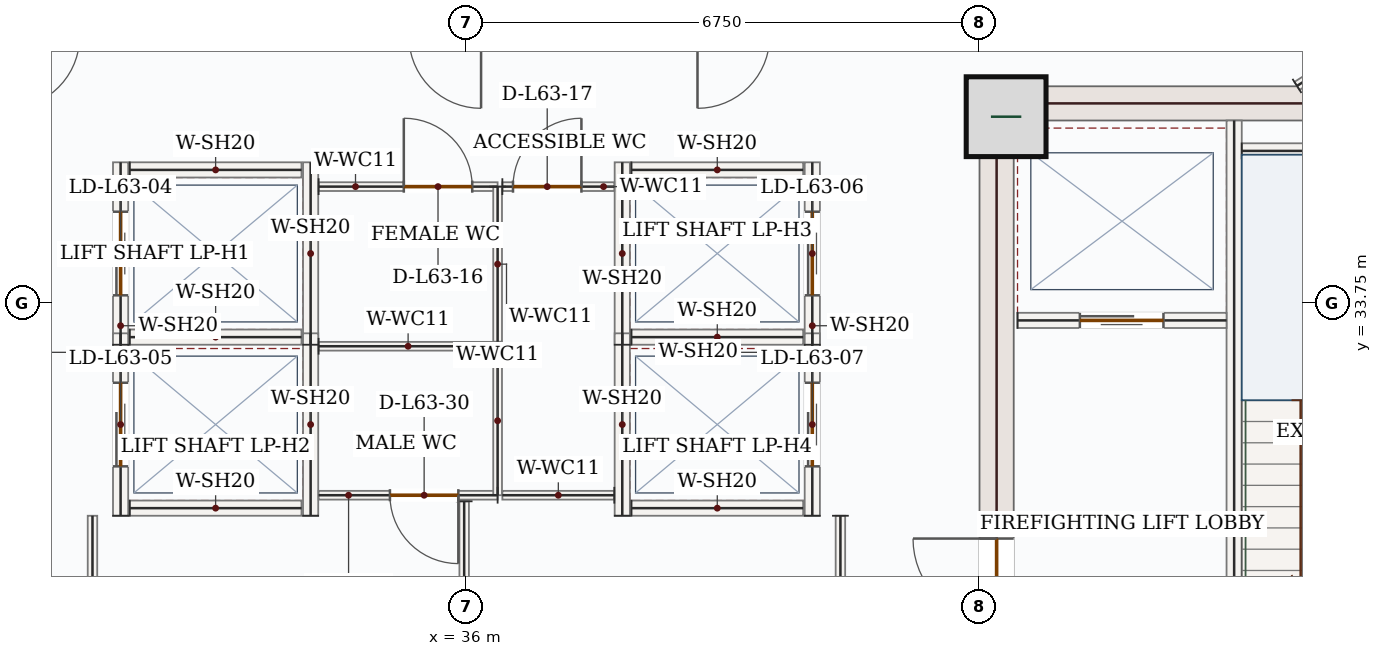
"""IFC4 building model, lengths in metres.
Left out: names, types, materials, properties, quantities, classifications, styles, units other than length and angle.
Written with IfcOpenShell. Run it as: python <this file> out.ifc"""

import sys

from ifc_helpers import new_model, si_unit, direction, frame, frame_2d, origin, origin_2d, place, context, subcontext, project, spatial, rectangle, extrude, source, transform, mapped, element, fill, save


model = new_model("IFC4")
c1 = context("Model", 3, precision=1e-05, world=origin(), true_north=direction((0.0, 1.0)))
c2 = subcontext(c1, "Body", "Model", "MODEL_VIEW")
j1 = project(units=[si_unit("LENGTHUNIT", "METRE"), si_unit("PLANEANGLEUNIT", "RADIAN")], contexts=[c1])
p1 = place(None, origin())
s1 = spatial("IfcSite", under=j1, at=p1, CompositionType="ELEMENT")
p2 = place(p1, origin())
s2 = spatial("IfcBuilding", under=s1, at=p2, CompositionType="ELEMENT")
p3 = place(p2, frame((0.0, 0.0, 265.35)))
s3 = spatial("IfcBuildingStorey", under=s2, at=p3, CompositionType="ELEMENT", Elevation=265.35)
p4 = place(p3, frame((42.975, 28.05, 0.0), z_axis=(0.0, 0.0, 1.0), x_axis=(0.0, 1.0, 0.0)))
e1 = element("IfcWall", 1, at=p4, inside=s3, PredefinedType="SHEAR", context=c2, shape_type="SweptSolid", body=[
    extrude(rectangle(XDim=8.55, YDim=0.45, at=frame_2d((4.275, 0.0))), origin(), (0.0, 0.0, 1.0), 3.5),
])
p5 = place(p4, frame((1.5, 0.0, 0.0)))
e2 = element("IfcOpeningElement", 2, at=p5, cuts=e1, PredefinedType="OPENING", context=c2, shape_type="SweptSolid", body=[
    extrude(rectangle(XDim=1.1, YDim=2.2, at=frame_2d((0.55, 1.1))), frame((0.0, 0.235, 0.0), z_axis=(0.0, -1.0, 0.0), x_axis=(1.0, 0.0, 0.0)), (0.0, 0.0, 1.0), 0.47),
])
m1 = source(origin(), c2, "Body", "SweptSolid", [
    extrude(rectangle(XDim=7.1, YDim=0.45, at=frame_2d((3.55, 0.0))), origin(), (0.0, 0.0, 1.0), 3.5),
])
p6 = place(p3, frame((43.2, 36.375, 0.0), z_axis=(0.0, 0.0, 1.0), x_axis=(1.0, 0.0, 0.0)))
e3 = element("IfcWall", 3, at=p6, inside=s3, PredefinedType="SHEAR", context=c2, shape_type="MappedRepresentation", body=[
    mapped(m1, transform((0.0, 0.0, 0.0), x_axis=(1.0, 0.0, 0.0), y_axis=(0.0, 1.0, 0.0), z_axis=(0.0, 0.0, 1.0), scale=1.0)),
])
m2 = source(origin(), c2, "Body", "SweptSolid", [
    extrude(rectangle(XDim=1.05, YDim=1.05, at=origin_2d()), origin(), (0.0, 0.0, 1.0), 3.75),
])
p7 = place(p3, frame((43.1, 36.2, 0.0), z_axis=(0.0, 0.0, 1.0), x_axis=(1.0, 0.0, 0.0)))
e4 = element("IfcColumn", 4, at=p7, inside=s3, PredefinedType="COLUMN", context=c2, shape_type="MappedRepresentation", body=[
    mapped(m2, transform((0.0, 0.0, 0.0), x_axis=(1.0, 0.0, 0.0), y_axis=(0.0, 1.0, 0.0), z_axis=(0.0, 0.0, 1.0), scale=1.0)),
])
p8 = place(p3, frame((46.1, 28.15, 0.0), z_axis=(0.0, 0.0, 1.0), x_axis=(0.0, 1.0, 0.0)))
e5 = element("IfcWall", 5, at=p8, inside=s3, PredefinedType="SOLIDWALL", context=c2, shape_type="SweptSolid", body=[
    extrude(rectangle(XDim=8.0, YDim=0.2, at=frame_2d((4.0, 0.0))), origin(), (0.0, 0.0, 1.0), 3.5),
])
p9 = place(p8, frame((0.4, 0.0, 0.0)))
e6 = element("IfcOpeningElement", 6, at=p9, cuts=e5, PredefinedType="OPENING", context=c2, shape_type="SweptSolid", body=[
    extrude(rectangle(XDim=1.05, YDim=2.15, at=frame_2d((0.525, 1.075))), frame((0.0, 0.11, 0.0), z_axis=(0.0, -1.0, 0.0), x_axis=(1.0, 0.0, 0.0)), (0.0, 0.0, 1.0), 0.22),
])
m3 = source(origin(), c2, "Body", "SweptSolid", [
    extrude(rectangle(XDim=3.25, YDim=0.2, at=frame_2d((1.625, 0.0))), origin(), (0.0, 0.0, 1.0), 3.5),
])
p10 = place(p3, frame((46.2, 35.75, 0.0), z_axis=(0.0, 0.0, 1.0), x_axis=(1.0, 0.0, 0.0)))
e7 = element("IfcWall", 7, at=p10, inside=s3, PredefinedType="SOLIDWALL", context=c2, shape_type="MappedRepresentation", body=[
    mapped(m3, transform((0.0, 0.0, 0.0), x_axis=(1.0, 0.0, 0.0), y_axis=(0.0, 1.0, 0.0), z_axis=(0.0, 0.0, 1.0), scale=1.0)),
])
p11 = place(p3, frame((43.25, 33.52, 0.0), z_axis=(0.0, 0.0, 1.0), x_axis=(1.0, 0.0, 0.0)))
e8 = element("IfcWall", 8, at=p11, inside=s3, PredefinedType="SOLIDWALL", context=c2, shape_type="SweptSolid", body=[
    extrude(rectangle(XDim=2.75, YDim=0.2, at=frame_2d((1.375, 0.0))), origin(), (0.0, 0.0, 1.0), 3.5),
])
p12 = place(p11, frame((0.82, 0.0, 0.0)))
e9 = element("IfcOpeningElement", 9, at=p12, cuts=e8, PredefinedType="OPENING", context=c2, shape_type="SweptSolid", body=[
    extrude(rectangle(XDim=1.1, YDim=2.15, at=frame_2d((0.55, 1.075))), frame((0.0, 0.11, 0.0), z_axis=(0.0, -1.0, 0.0), x_axis=(1.0, 0.0, 0.0)), (0.0, 0.0, 1.0), 0.22),
])
p13 = place(p3, frame((31.45, 33.2, 0.0), z_axis=(0.0, 0.0, 1.0), x_axis=(0.0, 1.0, 0.0)))
e10 = element("IfcWall", 10, at=p13, inside=s3, PredefinedType="SOLIDWALL", context=c2, shape_type="SweptSolid", body=[
    extrude(rectangle(XDim=2.4, YDim=0.2, at=frame_2d((1.2, 0.0))), origin(), (0.0, 0.0, 1.0), 3.5),
])
p14 = place(p13, frame((0.65, 0.0, 0.0)))
e11 = element("IfcOpeningElement", 11, at=p14, cuts=e10, PredefinedType="OPENING", context=c2, shape_type="SweptSolid", body=[
    extrude(rectangle(XDim=1.1, YDim=2.15, at=frame_2d((0.55, 1.075))), frame((0.0, 0.11, 0.0), z_axis=(0.0, -1.0, 0.0), x_axis=(1.0, 0.0, 0.0)), (0.0, 0.0, 1.0), 0.22),
])
m4 = source(origin(), c2, "Body", "SweptSolid", [
    extrude(rectangle(XDim=2.4, YDim=0.2, at=frame_2d((1.2, 0.0))), origin(), (0.0, 0.0, 1.0), 3.5),
])
p15 = place(p3, frame((33.95, 33.2, 0.0), z_axis=(0.0, 0.0, 1.0), x_axis=(0.0, 1.0, 0.0)))
e12 = element("IfcWall", 12, at=p15, inside=s3, PredefinedType="SOLIDWALL", context=c2, shape_type="MappedRepresentation", body=[
    mapped(m4, transform((0.0, 0.0, 0.0), x_axis=(1.0, 0.0, 0.0), y_axis=(0.0, 1.0, 0.0), z_axis=(0.0, 0.0, 1.0), scale=1.0)),
])
m5 = source(origin(), c2, "Body", "SweptSolid", [
    extrude(rectangle(XDim=2.26, YDim=0.2, at=frame_2d((1.13, 0.0))), origin(), (0.0, 0.0, 1.0), 3.5),
])
for number, where, z_axis, x_axis in (
    (13, (31.57, 33.3, 0.0), (0.0, 0.0, 1.0), (1.0, 0.0, 0.0)),
    (14, (31.57, 35.5, 0.0), (0.0, 0.0, 1.0), (1.0, 0.0, 0.0)),
):
    element("IfcWall", number, at=place(p3, frame(where, z_axis=z_axis, x_axis=x_axis)), inside=s3, PredefinedType="SOLIDWALL", context=c2, shape_type="MappedRepresentation", body=[
        mapped(m5, transform((0.0, 0.0, 0.0), x_axis=(1.0, 0.0, 0.0), y_axis=(0.0, 1.0, 0.0), z_axis=(0.0, 0.0, 1.0), scale=1.0)),
    ])
p16 = place(p3, frame((31.45, 30.95, 0.0), z_axis=(0.0, 0.0, 1.0), x_axis=(0.0, 1.0, 0.0)))
e15 = element("IfcWall", 15, at=p16, inside=s3, PredefinedType="SOLIDWALL", context=c2, shape_type="SweptSolid", body=[
    extrude(rectangle(XDim=2.4, YDim=0.2, at=frame_2d((1.2, 0.0))), origin(), (0.0, 0.0, 1.0), 3.5),
])
p17 = place(p16, frame((0.65, 0.0, 0.0)))
e16 = element("IfcOpeningElement", 16, at=p17, cuts=e15, PredefinedType="OPENING", context=c2, shape_type="SweptSolid", body=[
    extrude(rectangle(XDim=1.1, YDim=2.15, at=frame_2d((0.55, 1.075))), frame((0.0, 0.11, 0.0), z_axis=(0.0, -1.0, 0.0), x_axis=(1.0, 0.0, 0.0)), (0.0, 0.0, 1.0), 0.22),
])
p18 = place(p3, frame((33.95, 30.95, 0.0), z_axis=(0.0, 0.0, 1.0), x_axis=(0.0, 1.0, 0.0)))
e17 = element("IfcWall", 17, at=p18, inside=s3, PredefinedType="SOLIDWALL", context=c2, shape_type="MappedRepresentation", body=[
    mapped(m4, transform((0.0, 0.0, 0.0), x_axis=(1.0, 0.0, 0.0), y_axis=(0.0, 1.0, 0.0), z_axis=(0.0, 0.0, 1.0), scale=1.0)),
])
p19 = place(p3, frame((31.57, 31.05, 0.0), z_axis=(0.0, 0.0, 1.0), x_axis=(1.0, 0.0, 0.0)))
e18 = element("IfcWall", 18, at=p19, inside=s3, PredefinedType="SOLIDWALL", context=c2, shape_type="MappedRepresentation", body=[
    mapped(m5, transform((0.0, 0.0, 0.0), x_axis=(1.0, 0.0, 0.0), y_axis=(0.0, 1.0, 0.0), z_axis=(0.0, 0.0, 1.0), scale=1.0)),
])
p20 = place(p3, frame((38.05, 33.2, 0.0), z_axis=(0.0, 0.0, 1.0), x_axis=(0.0, 1.0, 0.0)))
e19 = element("IfcWall", 19, at=p20, inside=s3, PredefinedType="SOLIDWALL", context=c2, shape_type="MappedRepresentation", body=[
    mapped(m4, transform((0.0, 0.0, 0.0), x_axis=(1.0, 0.0, 0.0), y_axis=(0.0, 1.0, 0.0), z_axis=(0.0, 0.0, 1.0), scale=1.0)),
])
p21 = place(p3, frame((40.55, 33.2, 0.0), z_axis=(0.0, 0.0, 1.0), x_axis=(0.0, 1.0, 0.0)))
e20 = element("IfcWall", 20, at=p21, inside=s3, PredefinedType="SOLIDWALL", context=c2, shape_type="SweptSolid", body=[
    extrude(rectangle(XDim=2.4, YDim=0.2, at=frame_2d((1.2, 0.0))), origin(), (0.0, 0.0, 1.0), 3.5),
])
p22 = place(p21, frame((0.65, 0.0, 0.0)))
e21 = element("IfcOpeningElement", 21, at=p22, cuts=e20, PredefinedType="OPENING", context=c2, shape_type="SweptSolid", body=[
    extrude(rectangle(XDim=1.1, YDim=2.15, at=frame_2d((0.55, 1.075))), frame((0.0, 0.11, 0.0), z_axis=(0.0, -1.0, 0.0), x_axis=(1.0, 0.0, 0.0)), (0.0, 0.0, 1.0), 0.22),
])
for number, where, z_axis, x_axis in (
    (22, (38.17, 33.3, 0.0), (0.0, 0.0, 1.0), (1.0, 0.0, 0.0)),
    (23, (38.17, 35.5, 0.0), (0.0, 0.0, 1.0), (1.0, 0.0, 0.0)),
):
    element("IfcWall", number, at=place(p3, frame(where, z_axis=z_axis, x_axis=x_axis)), inside=s3, PredefinedType="SOLIDWALL", context=c2, shape_type="MappedRepresentation", body=[
        mapped(m5, transform((0.0, 0.0, 0.0), x_axis=(1.0, 0.0, 0.0), y_axis=(0.0, 1.0, 0.0), z_axis=(0.0, 0.0, 1.0), scale=1.0)),
    ])
p23 = place(p3, frame((38.05, 30.95, 0.0), z_axis=(0.0, 0.0, 1.0), x_axis=(0.0, 1.0, 0.0)))
e24 = element("IfcWall", 24, at=p23, inside=s3, PredefinedType="SOLIDWALL", context=c2, shape_type="MappedRepresentation", body=[
    mapped(m4, transform((0.0, 0.0, 0.0), x_axis=(1.0, 0.0, 0.0), y_axis=(0.0, 1.0, 0.0), z_axis=(0.0, 0.0, 1.0), scale=1.0)),
])
p24 = place(p3, frame((40.55, 30.95, 0.0), z_axis=(0.0, 0.0, 1.0), x_axis=(0.0, 1.0, 0.0)))
e25 = element("IfcWall", 25, at=p24, inside=s3, PredefinedType="SOLIDWALL", context=c2, shape_type="SweptSolid", body=[
    extrude(rectangle(XDim=2.4, YDim=0.2, at=frame_2d((1.2, 0.0))), origin(), (0.0, 0.0, 1.0), 3.5),
])
p25 = place(p24, frame((0.65, 0.0, 0.0)))
e26 = element("IfcOpeningElement", 26, at=p25, cuts=e25, PredefinedType="OPENING", context=c2, shape_type="SweptSolid", body=[
    extrude(rectangle(XDim=1.1, YDim=2.15, at=frame_2d((0.55, 1.075))), frame((0.0, 0.11, 0.0), z_axis=(0.0, -1.0, 0.0), x_axis=(1.0, 0.0, 0.0)), (0.0, 0.0, 1.0), 0.22),
])
p26 = place(p3, frame((38.17, 31.05, 0.0), z_axis=(0.0, 0.0, 1.0), x_axis=(1.0, 0.0, 0.0)))
e27 = element("IfcWall", 27, at=p26, inside=s3, PredefinedType="SOLIDWALL", context=c2, shape_type="MappedRepresentation", body=[
    mapped(m5, transform((0.0, 0.0, 0.0), x_axis=(1.0, 0.0, 0.0), y_axis=(0.0, 1.0, 0.0), z_axis=(0.0, 0.0, 1.0), scale=1.0)),
])
p27 = place(p3, frame((36.41, 31.22, 0.0), z_axis=(0.0, 0.0, 1.0), x_axis=(-1.0, 0.0, 0.0)))
e28 = element("IfcWall", 28, at=p27, inside=s3, PredefinedType="PARTITIONING", context=c2, shape_type="SweptSolid", body=[
    extrude(rectangle(XDim=2.355, YDim=0.115, at=frame_2d((1.177, 0.0))), origin(), (0.0, 0.0, 1.0), 3.5),
])
p28 = place(p27, frame((0.517, 0.0, 0.0)))
e29 = element("IfcOpeningElement", 29, at=p28, cuts=e28, PredefinedType="OPENING", context=c2, shape_type="SweptSolid", body=[
    extrude(rectangle(XDim=0.9, YDim=2.1, at=frame_2d((0.45, 1.05))), frame((0.0, 0.067, 0.0), z_axis=(0.0, -1.0, 0.0), x_axis=(1.0, 0.0, 0.0)), (0.0, 0.0, 1.0), 0.135),
])
m6 = source(origin(), c2, "Body", "SweptSolid", [
    extrude(rectangle(XDim=2.355, YDim=0.115, at=frame_2d((1.177, 0.0))), origin(), (0.0, 0.0, 1.0), 3.5),
])
p29 = place(p3, frame((34.055, 33.18, 0.0), z_axis=(0.0, 0.0, 1.0), x_axis=(1.0, 0.0, 0.0)))
e30 = element("IfcWall", 30, at=p29, inside=s3, PredefinedType="PARTITIONING", context=c2, shape_type="MappedRepresentation", body=[
    mapped(m6, transform((0.0, 0.0, 0.0), x_axis=(1.0, 0.0, 0.0), y_axis=(0.0, 1.0, 0.0), z_axis=(0.0, 0.0, 1.0), scale=1.0)),
])
m7 = source(origin(), c2, "Body", "SweptSolid", [
    extrude(rectangle(XDim=1.96, YDim=0.115, at=frame_2d((0.98, 0.0))), origin(), (0.0, 0.0, 1.0), 3.5),
])
p30 = place(p3, frame((36.41, 33.18, 0.0), z_axis=(0.0, 0.0, 1.0), x_axis=(0.0, -1.0, 0.0)))
e31 = element("IfcWall", 31, at=p30, inside=s3, PredefinedType="PARTITIONING", context=c2, shape_type="MappedRepresentation", body=[
    mapped(m7, transform((0.0, 0.0, 0.0), x_axis=(1.0, 0.0, 0.0), y_axis=(0.0, 1.0, 0.0), z_axis=(0.0, 0.0, 1.0), scale=1.0)),
])
p31 = place(p3, frame((34.055, 35.28, 0.0), z_axis=(0.0, 0.0, 1.0), x_axis=(1.0, 0.0, 0.0)))
e32 = element("IfcWall", 32, at=p31, inside=s3, PredefinedType="PARTITIONING", context=c2, shape_type="SweptSolid", body=[
    extrude(rectangle(XDim=2.355, YDim=0.115, at=frame_2d((1.177, 0.0))), origin(), (0.0, 0.0, 1.0), 3.5),
])
p32 = place(p31, frame((1.121, 0.0, 0.0)))
e33 = element("IfcOpeningElement", 33, at=p32, cuts=e32, PredefinedType="OPENING", context=c2, shape_type="SweptSolid", body=[
    extrude(rectangle(XDim=0.9, YDim=2.1, at=frame_2d((0.45, 1.05))), frame((0.0, 0.067, 0.0), z_axis=(0.0, -1.0, 0.0), x_axis=(1.0, 0.0, 0.0)), (0.0, 0.0, 1.0), 0.135),
])
m8 = source(origin(), c2, "Body", "SweptSolid", [
    extrude(rectangle(XDim=2.04, YDim=0.115, at=frame_2d((1.02, 0.0))), origin(), (0.0, 0.0, 1.0), 3.5),
])
p33 = place(p3, frame((36.41, 35.28, 0.0), z_axis=(0.0, 0.0, 1.0), x_axis=(0.0, -1.0, 0.0)))
e34 = element("IfcWall", 34, at=p33, inside=s3, PredefinedType="PARTITIONING", context=c2, shape_type="MappedRepresentation", body=[
    mapped(m8, transform((0.0, 0.0, 0.0), x_axis=(1.0, 0.0, 0.0), y_axis=(0.0, 1.0, 0.0), z_axis=(0.0, 0.0, 1.0), scale=1.0)),
])
m9 = source(origin(), c2, "Body", "SweptSolid", [
    extrude(rectangle(XDim=1.473, YDim=0.115, at=frame_2d((0.736, 0.0))), origin(), (0.0, 0.0, 1.0), 3.5),
])
p34 = place(p3, frame((37.945, 31.22, 0.0), z_axis=(0.0, 0.0, 1.0), x_axis=(-1.0, 0.0, 0.0)))
e35 = element("IfcWall", 35, at=p34, inside=s3, PredefinedType="PARTITIONING", context=c2, shape_type="MappedRepresentation", body=[
    mapped(m9, transform((0.0, 0.0, 0.0), x_axis=(1.0, 0.0, 0.0), y_axis=(0.0, 1.0, 0.0), z_axis=(0.0, 0.0, 1.0), scale=1.0)),
])
p35 = place(p3, frame((36.472, 35.28, 0.0), z_axis=(0.0, 0.0, 1.0), x_axis=(1.0, 0.0, 0.0)))
e36 = element("IfcWall", 36, at=p35, inside=s3, PredefinedType="PARTITIONING", context=c2, shape_type="SweptSolid", body=[
    extrude(rectangle(XDim=1.473, YDim=0.115, at=frame_2d((0.736, 0.0))), origin(), (0.0, 0.0, 1.0), 3.5),
])
p36 = place(p35, frame((0.14, 0.0, 0.0)))
e37 = element("IfcOpeningElement", 37, at=p36, cuts=e36, PredefinedType="OPENING", context=c2, shape_type="SweptSolid", body=[
    extrude(rectangle(XDim=0.9, YDim=2.1, at=frame_2d((0.45, 1.05))), frame((0.0, 0.067, 0.0), z_axis=(0.0, -1.0, 0.0), x_axis=(1.0, 0.0, 0.0)), (0.0, 0.0, 1.0), 0.135),
])
m10 = source(origin(), c2, "Body", "SweptSolid", [
    extrude(rectangle(XDim=3.2, YDim=0.125, at=frame_2d((1.6, 0.0))), origin(), (0.0, 0.0, 1.0), 3.5),
])
p37 = place(p3, frame((35.97, 31.14, 0.0), z_axis=(0.0, 0.0, 1.0), x_axis=(0.0, -1.0, 0.0)))
e38 = element("IfcWall", 38, at=p37, inside=s3, PredefinedType="PARTITIONING", context=c2, shape_type="MappedRepresentation", body=[
    mapped(m10, transform((0.0, 0.0, 0.0), x_axis=(1.0, 0.0, 0.0), y_axis=(0.0, 1.0, 0.0), z_axis=(0.0, 0.0, 1.0), scale=1.0)),
])
m11 = source(origin(), c2, "Body", "SweptSolid", [
    extrude(rectangle(XDim=2.942, YDim=0.125, at=frame_2d((1.471, 0.0))), origin(), (0.0, 0.0, 1.0), 3.5),
])
p38 = place(p3, frame((31.08, 28.008, 0.0), z_axis=(0.0, 0.0, 1.0), x_axis=(0.0, 1.0, 0.0)))
e39 = element("IfcWall", 39, at=p38, inside=s3, PredefinedType="PARTITIONING", context=c2, shape_type="MappedRepresentation", body=[
    mapped(m11, transform((0.0, 0.0, 0.0), x_axis=(1.0, 0.0, 0.0), y_axis=(0.0, 1.0, 0.0), z_axis=(0.0, 0.0, 1.0), scale=1.0)),
])
m12 = source(origin(), c2, "Body", "SweptSolid", [
    extrude(rectangle(XDim=3.01, YDim=0.125, at=frame_2d((1.505, 0.0))), origin(), (0.0, 0.0, 1.0), 3.5),
])
p39 = place(p3, frame((40.92, 30.95, 0.0), z_axis=(0.0, 0.0, 1.0), x_axis=(0.0, -1.0, 0.0)))
e40 = element("IfcWall", 40, at=p39, inside=s3, PredefinedType="PARTITIONING", context=c2, shape_type="MappedRepresentation", body=[
    mapped(m12, transform((0.0, 0.0, 0.0), x_axis=(1.0, 0.0, 0.0), y_axis=(0.0, 1.0, 0.0), z_axis=(0.0, 0.0, 1.0), scale=1.0)),
])
p40 = place(p3, frame((46.927, 36.605, 0.0), z_axis=(0.0, 0.0, 1.0), x_axis=(0.843398332862, 0.537288797693, 0.0)))
e41 = element("IfcWall", 41, at=p40, inside=s3, PredefinedType="PARTITIONING", context=c2, shape_type="SweptSolid", body=[
    extrude(rectangle(XDim=5.924, YDim=0.125, at=frame_2d((2.962, 0.0))), origin(), (0.0, 0.0, 1.0), 3.5),
])
p41 = place(p40, frame((2.487, 0.0, 0.0)))
e42 = element("IfcOpeningElement", 42, at=p41, cuts=e41, PredefinedType="OPENING", context=c2, shape_type="SweptSolid", body=[
    extrude(rectangle(XDim=0.95, YDim=2.15, at=frame_2d((0.475, 1.075))), frame((0.0, 0.073, 0.0), z_axis=(0.0, -1.0, 0.0), x_axis=(1.0, 0.0, 0.0)), (0.0, 0.0, 1.0), 0.145),
])
m13 = source(origin(), c2, "Body", "SweptSolid", [
    extrude(rectangle(XDim=1.1, YDim=2.15, at=frame_2d((0.55, 1.075))), frame((0.0, 0.025, 0.0), z_axis=(0.0, -1.0, 0.0), x_axis=(1.0, 0.0, 0.0)), (0.0, 0.0, 1.0), 0.05),
])
p42 = place(p12, origin())
e43 = element("IfcDoor", 43, at=p42, inside=s3, OperationType="DOUBLE_DOOR_SLIDING", PredefinedType="DOOR", context=c2, shape_type="MappedRepresentation", body=[
    mapped(m13, transform((0.0, 0.0, 0.0), x_axis=(1.0, 0.0, 0.0), y_axis=(0.0, 1.0, 0.0), z_axis=(0.0, 0.0, 1.0), scale=1.0)),
])
fill(e9, e43)
m14 = source(origin(), c2, "Body", "SweptSolid", [
    extrude(rectangle(XDim=1.1, YDim=2.2, at=frame_2d((0.55, 1.1))), frame((0.0, 0.025, 0.0), z_axis=(0.0, -1.0, 0.0), x_axis=(1.0, 0.0, 0.0)), (0.0, 0.0, 1.0), 0.05),
])
p43 = place(p5, origin())
e44 = element("IfcDoor", 44, at=p43, inside=s3, OperationType="SINGLE_SWING_RIGHT", PredefinedType="DOOR", context=c2, shape_type="MappedRepresentation", body=[
    mapped(m14, transform((0.0, 0.0, 0.0), x_axis=(1.0, 0.0, 0.0), y_axis=(0.0, 1.0, 0.0), z_axis=(0.0, 0.0, 1.0), scale=1.0)),
])
fill(e2, e44)
p44 = place(p14, origin())
e45 = element("IfcDoor", 45, at=p44, inside=s3, OperationType="DOUBLE_DOOR_SLIDING", PredefinedType="DOOR", context=c2, shape_type="MappedRepresentation", body=[
    mapped(m13, transform((0.0, 0.0, 0.0), x_axis=(1.0, 0.0, 0.0), y_axis=(0.0, 1.0, 0.0), z_axis=(0.0, 0.0, 1.0), scale=1.0)),
])
fill(e11, e45)
p45 = place(p17, origin())
e46 = element("IfcDoor", 46, at=p45, inside=s3, OperationType="DOUBLE_DOOR_SLIDING", PredefinedType="DOOR", context=c2, shape_type="MappedRepresentation", body=[
    mapped(m13, transform((0.0, 0.0, 0.0), x_axis=(1.0, 0.0, 0.0), y_axis=(0.0, 1.0, 0.0), z_axis=(0.0, 0.0, 1.0), scale=1.0)),
])
fill(e16, e46)
p46 = place(p22, origin())
e47 = element("IfcDoor", 47, at=p46, inside=s3, OperationType="DOUBLE_DOOR_SLIDING", PredefinedType="DOOR", context=c2, shape_type="MappedRepresentation", body=[
    mapped(m13, transform((0.0, 0.0, 0.0), x_axis=(1.0, 0.0, 0.0), y_axis=(0.0, 1.0, 0.0), z_axis=(0.0, 0.0, 1.0), scale=1.0)),
])
fill(e21, e47)
p47 = place(p25, origin())
e48 = element("IfcDoor", 48, at=p47, inside=s3, OperationType="DOUBLE_DOOR_SLIDING", PredefinedType="DOOR", context=c2, shape_type="MappedRepresentation", body=[
    mapped(m13, transform((0.0, 0.0, 0.0), x_axis=(1.0, 0.0, 0.0), y_axis=(0.0, 1.0, 0.0), z_axis=(0.0, 0.0, 1.0), scale=1.0)),
])
fill(e26, e48)
m15 = source(origin(), c2, "Body", "SweptSolid", [
    extrude(rectangle(XDim=0.9, YDim=2.1, at=frame_2d((0.45, 1.05))), frame((0.0, 0.025, 0.0), z_axis=(0.0, -1.0, 0.0), x_axis=(1.0, 0.0, 0.0)), (0.0, 0.0, 1.0), 0.05),
])
p48 = place(p32, origin())
e49 = element("IfcDoor", 49, at=p48, inside=s3, OperationType="SINGLE_SWING_LEFT", PredefinedType="DOOR", context=c2, shape_type="MappedRepresentation", body=[
    mapped(m15, transform((0.0, 0.0, 0.0), x_axis=(1.0, 0.0, 0.0), y_axis=(0.0, 1.0, 0.0), z_axis=(0.0, 0.0, 1.0), scale=1.0)),
])
fill(e33, e49)
p49 = place(p36, origin())
e50 = element("IfcDoor", 50, at=p49, inside=s3, OperationType="SINGLE_SWING_RIGHT", PredefinedType="DOOR", context=c2, shape_type="MappedRepresentation", body=[
    mapped(m15, transform((0.0, 0.0, 0.0), x_axis=(1.0, 0.0, 0.0), y_axis=(0.0, 1.0, 0.0), z_axis=(0.0, 0.0, 1.0), scale=1.0)),
])
fill(e37, e50)
p50 = place(p28, origin())
e51 = element("IfcDoor", 51, at=p50, inside=s3, OperationType="SINGLE_SWING_LEFT", PredefinedType="DOOR", context=c2, shape_type="MappedRepresentation", body=[
    mapped(m15, transform((0.0, 0.0, 0.0), x_axis=(1.0, 0.0, 0.0), y_axis=(0.0, 1.0, 0.0), z_axis=(0.0, 0.0, 1.0), scale=1.0)),
])
fill(e29, e51)
save(model, sys.argv[1])
